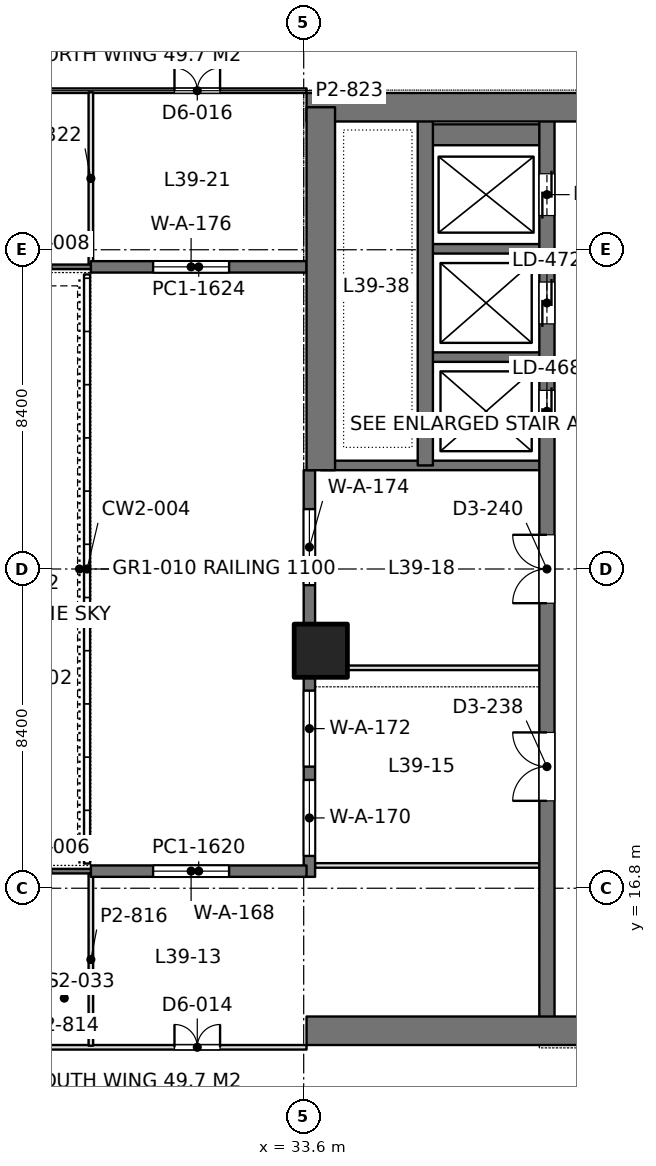
"""IFC4 building model, lengths in metres.
Left out: names, types, materials, properties, quantities, classifications, styles, units other than length and angle.
Written with IfcOpenShell. Run it as: python <this file> out.ifc"""

import sys

from ifc_helpers import new_model, si_unit, direction, frame, frame_2d, origin, origin_2d, place, context, subcontext, project, spatial, rectangle, extrude, element, fill, save


model = new_model("IFC4")
c1 = context("Model", 3, precision=1e-05, world=origin(), true_north=direction((0.0, 1.0)))
c2 = subcontext(c1, "Body", "Model", "MODEL_VIEW")
j1 = project(units=[si_unit("LENGTHUNIT", "METRE"), si_unit("PLANEANGLEUNIT", "RADIAN")], contexts=[c1])
p1 = place(None, origin())
s1 = spatial("IfcSite", under=j1, at=p1, CompositionType="ELEMENT")
p2 = place(p1, origin())
s2 = spatial("IfcBuilding", under=s1, at=p2, CompositionType="ELEMENT")
p3 = place(p2, frame((0.0, 0.0, 173.4)))
s3 = spatial("IfcBuildingStorey", under=s2, at=p3, CompositionType="ELEMENT", Elevation=173.4)
p4 = place(p3, frame((34.05, 23.05, 0.0), z_axis=(0.0, 0.0, 1.0), x_axis=(1.0, 0.0, 0.0)))
e1 = element("IfcColumn", 1, at=p4, inside=s3, PredefinedType="COLUMN", context=c2, shape_type="SweptSolid", body=[
    extrude(rectangle(XDim=1.4, YDim=1.4, at=origin_2d()), origin(), (0.0, 0.0, 1.0), 4.2),
])
p5 = place(p3, frame((33.675, 13.05, 0.0), z_axis=(0.0, 0.0, 1.0), x_axis=(1.0, 0.0, 0.0)))
e2 = element("IfcWall", 2, at=p5, inside=s3, PredefinedType="SHEAR", context=c2, shape_type="SweptSolid", body=[
    extrude(rectangle(XDim=17.85, YDim=0.75, at=frame_2d((8.925, 0.0))), origin(), (0.0, 0.0, 1.0), 4.2),
])
p6 = place(p5, frame((7.175, 0.0, 0.0)))
e3 = element("IfcOpeningElement", 3, at=p6, cuts=e2, PredefinedType="OPENING", context=c2, shape_type="SweptSolid", body=[
    extrude(rectangle(XDim=1.8, YDim=2.4, at=frame_2d((0.9, 1.2))), frame((0.0, 0.385, 0.0), z_axis=(0.0, -1.0, 0.0), x_axis=(1.0, 0.0, 0.0)), (0.0, 0.0, 1.0), 0.77),
])
p7 = place(p3, frame((33.675, 37.35, 0.0), z_axis=(0.0, 0.0, 1.0), x_axis=(1.0, 0.0, 0.0)))
e4 = element("IfcWall", 4, at=p7, inside=s3, PredefinedType="SHEAR", context=c2, shape_type="SweptSolid", body=[
    extrude(rectangle(XDim=17.85, YDim=0.75, at=frame_2d((8.925, 0.0))), origin(), (0.0, 0.0, 1.0), 4.2),
])
p8 = place(p7, frame((7.175, 0.0, 0.0)))
e5 = element("IfcOpeningElement", 5, at=p8, cuts=e4, PredefinedType="OPENING", context=c2, shape_type="SweptSolid", body=[
    extrude(rectangle(XDim=1.8, YDim=2.4, at=frame_2d((0.9, 1.2))), frame((0.0, 0.385, 0.0), z_axis=(0.0, -1.0, 0.0), x_axis=(1.0, 0.0, 0.0)), (0.0, 0.0, 1.0), 0.77),
])
p9 = place(p3, frame((34.05, 27.8, 0.0), z_axis=(0.0, 0.0, 1.0), x_axis=(0.0, 1.0, 0.0)))
e6 = element("IfcWall", 6, at=p9, inside=s3, PredefinedType="SHEAR", context=c2, shape_type="SweptSolid", body=[
    extrude(rectangle(XDim=9.55, YDim=0.75, at=frame_2d((4.775, 0.0))), origin(), (0.0, 0.0, 1.0), 4.2),
])
p10 = place(p3, frame((40.0, 13.05, 0.0), z_axis=(0.0, 0.0, 1.0), x_axis=(0.0, 1.0, 0.0)))
e7 = element("IfcWall", 7, at=p10, inside=s3, PredefinedType="SHEAR", context=c2, shape_type="SweptSolid", body=[
    extrude(rectangle(XDim=24.3, YDim=0.4, at=frame_2d((12.15, 0.0))), origin(), (0.0, 0.0, 1.0), 4.2),
])
p11 = place(p10, frame((15.75, 0.0, 0.0)))
e8 = element("IfcOpeningElement", 8, at=p11, cuts=e7, PredefinedType="OPENING", context=c2, shape_type="SweptSolid", body=[
    extrude(rectangle(XDim=1.1, YDim=2.2, at=frame_2d((0.55, 1.1))), frame((0.0, 0.21, 0.0), z_axis=(0.0, -1.0, 0.0), x_axis=(1.0, 0.0, 0.0)), (0.0, 0.0, 1.0), 0.42),
])
p12 = place(p10, frame((18.6, 0.0, 0.0)))
e9 = element("IfcOpeningElement", 9, at=p12, cuts=e7, PredefinedType="OPENING", context=c2, shape_type="SweptSolid", body=[
    extrude(rectangle(XDim=1.1, YDim=2.2, at=frame_2d((0.55, 1.1))), frame((0.0, 0.21, 0.0), z_axis=(0.0, -1.0, 0.0), x_axis=(1.0, 0.0, 0.0)), (0.0, 0.0, 1.0), 0.42),
])
p13 = place(p10, frame((21.45, 0.0, 0.0)))
e10 = element("IfcOpeningElement", 10, at=p13, cuts=e7, PredefinedType="OPENING", context=c2, shape_type="SweptSolid", body=[
    extrude(rectangle(XDim=1.1, YDim=2.2, at=frame_2d((0.55, 1.1))), frame((0.0, 0.21, 0.0), z_axis=(0.0, -1.0, 0.0), x_axis=(1.0, 0.0, 0.0)), (0.0, 0.0, 1.0), 0.42),
])
p14 = place(p10, frame((6.05, 0.0, 0.0)))
e11 = element("IfcOpeningElement", 11, at=p14, cuts=e7, PredefinedType="OPENING", context=c2, shape_type="SweptSolid", body=[
    extrude(rectangle(XDim=1.8, YDim=2.4, at=frame_2d((0.9, 1.2))), frame((0.0, 0.21, 0.0), z_axis=(0.0, -1.0, 0.0), x_axis=(1.0, 0.0, 0.0)), (0.0, 0.0, 1.0), 0.42),
])
p15 = place(p10, frame((11.25, 0.0, 0.0)))
e12 = element("IfcOpeningElement", 12, at=p15, cuts=e7, PredefinedType="OPENING", context=c2, shape_type="SweptSolid", body=[
    extrude(rectangle(XDim=1.8, YDim=2.4, at=frame_2d((0.9, 1.2))), frame((0.0, 0.21, 0.0), z_axis=(0.0, -1.0, 0.0), x_axis=(1.0, 0.0, 0.0)), (0.0, 0.0, 1.0), 0.42),
])
p16 = place(p3, frame((36.8, 27.925, 0.0), z_axis=(0.0, 0.0, 1.0), x_axis=(0.0, 1.0, 0.0)))
e13 = element("IfcWall", 13, at=p16, inside=s3, PredefinedType="SHEAR", context=c2, shape_type="SweptSolid", body=[
    extrude(rectangle(XDim=9.425, YDim=0.4, at=frame_2d((4.712, 0.0))), origin(), (0.0, 0.0, 1.0), 4.2),
])
p17 = place(p3, frame((40.0, 27.925, 0.0), z_axis=(0.0, 0.0, 1.0), x_axis=(-1.0, 0.0, 0.0)))
e14 = element("IfcWall", 14, at=p17, inside=s3, PredefinedType="SHEAR", context=c2, shape_type="SweptSolid", body=[
    extrude(rectangle(XDim=5.95, YDim=0.25, at=frame_2d((2.975, 0.0))), origin(), (0.0, 0.0, 1.0), 4.2),
])
for number, where, z_axis, x_axis in (
    (15, (40.0, 30.775, 0.0), (0.0, 0.0, 1.0), (-1.0, 0.0, 0.0)),
    (16, (40.0, 33.625, 0.0), (0.0, 0.0, 1.0), (-1.0, 0.0, 0.0)),
):
    element("IfcWall", number, at=place(p3, frame(where, z_axis=z_axis, x_axis=x_axis)), inside=s3, PredefinedType="SHEAR", context=c2, shape_type="SweptSolid", body=[
        extrude(rectangle(XDim=3.2, YDim=0.25, at=frame_2d((1.6, 0.0))), origin(), (0.0, 0.0, 1.0), 4.2),
    ])
p18 = place(p3, frame((40.0, 36.625, 0.0), z_axis=(0.0, 0.0, 1.0), x_axis=(-1.0, 0.0, 0.0)))
e17 = element("IfcWall", 17, at=p18, inside=s3, PredefinedType="SHEAR", context=c2, shape_type="SweptSolid", body=[
    extrude(rectangle(XDim=3.2, YDim=0.55, at=frame_2d((1.6, 0.0))), origin(), (0.0, 0.0, 1.0), 4.2),
])
p19 = place(p3, frame((33.75, 17.1, 0.0), z_axis=(0.0, 0.0, 1.0), x_axis=(0.0, 1.0, 0.0)))
e18 = element("IfcWall", 18, at=p19, inside=s3, PredefinedType="SOLIDWALL", context=c2, shape_type="SweptSolid", body=[
    extrude(rectangle(XDim=10.7, YDim=0.3, at=frame_2d((5.35, 0.0))), origin(), (0.0, 0.0, 1.0), 4.05),
])
p20 = place(p19, frame((0.55, 0.0, 0.1)))
e19 = element("IfcOpeningElement", 19, at=p20, cuts=e18, PredefinedType="OPENING", context=c2, shape_type="SweptSolid", body=[
    extrude(rectangle(XDim=2.0, YDim=3.0, at=frame_2d((1.0, 1.5))), frame((0.0, 0.16, 0.0), z_axis=(0.0, -1.0, 0.0), x_axis=(1.0, 0.0, 0.0)), (0.0, 0.0, 1.0), 0.32),
])
p21 = place(p19, frame((2.9, 0.0, 0.1)))
e20 = element("IfcOpeningElement", 20, at=p21, cuts=e18, PredefinedType="OPENING", context=c2, shape_type="SweptSolid", body=[
    extrude(rectangle(XDim=2.0, YDim=3.0, at=frame_2d((1.0, 1.5))), frame((0.0, 0.16, 0.0), z_axis=(0.0, -1.0, 0.0), x_axis=(1.0, 0.0, 0.0)), (0.0, 0.0, 1.0), 0.32),
])
p22 = place(p19, frame((7.675, 0.0, 0.1)))
e21 = element("IfcOpeningElement", 21, at=p22, cuts=e18, PredefinedType="OPENING", context=c2, shape_type="SweptSolid", body=[
    extrude(rectangle(XDim=2.0, YDim=3.0, at=frame_2d((1.0, 1.5))), frame((0.0, 0.16, 0.0), z_axis=(0.0, -1.0, 0.0), x_axis=(1.0, 0.0, 0.0)), (0.0, 0.0, 1.0), 0.32),
])
p23 = place(p3, frame((25.75, 17.25, 0.0), z_axis=(0.0, 0.0, 1.0), x_axis=(1.0, 0.0, 0.0)))
e22 = element("IfcWall", 22, at=p23, inside=s3, PredefinedType="SOLIDWALL", context=c2, shape_type="SweptSolid", body=[
    extrude(rectangle(XDim=2.25, YDim=0.12, at=frame_2d((1.125, 0.0))), origin(), (0.0, 0.0, 1.0), 4.05),
])
p24 = place(p3, frame((28.0, 17.25, 0.0), z_axis=(0.0, 0.0, 1.0), x_axis=(1.0, 0.0, 0.0)))
e23 = element("IfcWall", 23, at=p24, inside=s3, PredefinedType="SOLIDWALL", context=c2, shape_type="SweptSolid", body=[
    extrude(rectangle(XDim=5.675, YDim=0.3, at=frame_2d((2.837, 0.0))), origin(), (0.0, 0.0, 1.0), 4.05),
])
p25 = place(p24, frame((1.637, 0.0, 0.1)))
e24 = element("IfcOpeningElement", 24, at=p25, cuts=e23, PredefinedType="OPENING", context=c2, shape_type="SweptSolid", body=[
    extrude(rectangle(XDim=2.0, YDim=3.0, at=frame_2d((1.0, 1.5))), frame((0.0, 0.16, 0.0), z_axis=(0.0, -1.0, 0.0), x_axis=(1.0, 0.0, 0.0)), (0.0, 0.0, 1.0), 0.32),
])
p26 = place(p3, frame((25.75, 33.15, 0.0), z_axis=(0.0, 0.0, 1.0), x_axis=(1.0, 0.0, 0.0)))
e25 = element("IfcWall", 25, at=p26, inside=s3, PredefinedType="SOLIDWALL", context=c2, shape_type="SweptSolid", body=[
    extrude(rectangle(XDim=2.25, YDim=0.12, at=frame_2d((1.125, 0.0))), origin(), (0.0, 0.0, 1.0), 4.05),
])
p27 = place(p3, frame((28.0, 33.15, 0.0), z_axis=(0.0, 0.0, 1.0), x_axis=(1.0, 0.0, 0.0)))
e26 = element("IfcWall", 26, at=p27, inside=s3, PredefinedType="SOLIDWALL", context=c2, shape_type="SweptSolid", body=[
    extrude(rectangle(XDim=5.675, YDim=0.3, at=frame_2d((2.837, 0.0))), origin(), (0.0, 0.0, 1.0), 4.05),
])
p28 = place(p27, frame((1.637, 0.0, 0.1)))
e27 = element("IfcOpeningElement", 27, at=p28, cuts=e26, PredefinedType="OPENING", context=c2, shape_type="SweptSolid", body=[
    extrude(rectangle(XDim=2.0, YDim=3.0, at=frame_2d((1.0, 1.5))), frame((0.0, 0.16, 0.0), z_axis=(0.0, -1.0, 0.0), x_axis=(1.0, 0.0, 0.0)), (0.0, 0.0, 1.0), 0.32),
])
p29 = place(p3, frame((33.898, 17.4, 0.0), z_axis=(0.0, 0.0, 1.0), x_axis=(1.0, 0.0, 0.0)))
e28 = element("IfcWall", 28, at=p29, inside=s3, PredefinedType="PARTITIONING", context=c2, shape_type="SweptSolid", body=[
    extrude(rectangle(XDim=5.904, YDim=0.12, at=frame_2d((2.952, 0.0))), origin(), (0.0, 0.0, 1.0), 3.55),
])
p30 = place(p3, frame((34.749, 22.6, 0.0), z_axis=(0.0, 0.0, 1.0), x_axis=(1.0, 0.0, 0.0)))
e29 = element("IfcWall", 29, at=p30, inside=s3, PredefinedType="PARTITIONING", context=c2, shape_type="SweptSolid", body=[
    extrude(rectangle(XDim=5.053, YDim=0.12, at=frame_2d((2.526, 0.0))), origin(), (0.0, 0.0, 1.0), 4.05),
])
p31 = place(p3, frame((16.725, 12.615, 0.0), z_axis=(0.0, 0.0, 1.0), x_axis=(1.0, 0.0, 0.0)))
e30 = element("IfcWall", 30, at=p31, inside=s3, PredefinedType="PARTITIONING", context=c2, shape_type="SweptSolid", body=[
    extrude(rectangle(XDim=16.95, YDim=0.12, at=frame_2d((8.475, 0.0))), origin(), (0.0, 0.0, 1.0), 3.55),
])
p32 = place(p31, frame((2.275, 0.0, 0.0)))
e31 = element("IfcOpeningElement", 31, at=p32, cuts=e30, PredefinedType="OPENING", context=c2, shape_type="SweptSolid", body=[
    extrude(rectangle(XDim=1.2, YDim=2.2, at=frame_2d((0.6, 1.1))), frame((0.0, 0.07, 0.0), z_axis=(0.0, -1.0, 0.0), x_axis=(1.0, 0.0, 0.0)), (0.0, 0.0, 1.0), 0.14),
])
p33 = place(p31, frame((7.575, 0.0, 0.0)))
e32 = element("IfcOpeningElement", 32, at=p33, cuts=e30, PredefinedType="OPENING", context=c2, shape_type="SweptSolid", body=[
    extrude(rectangle(XDim=1.8, YDim=2.2, at=frame_2d((0.9, 1.1))), frame((0.0, 0.07, 0.0), z_axis=(0.0, -1.0, 0.0), x_axis=(1.0, 0.0, 0.0)), (0.0, 0.0, 1.0), 0.14),
])
p34 = place(p31, frame((13.475, 0.0, 0.0)))
e33 = element("IfcOpeningElement", 33, at=p34, cuts=e30, PredefinedType="OPENING", context=c2, shape_type="SweptSolid", body=[
    extrude(rectangle(XDim=1.2, YDim=2.2, at=frame_2d((0.6, 1.1))), frame((0.0, 0.07, 0.0), z_axis=(0.0, -1.0, 0.0), x_axis=(1.0, 0.0, 0.0)), (0.0, 0.0, 1.0), 0.14),
])
p35 = place(p3, frame((28.0, 12.658, 0.0), z_axis=(0.0, 0.0, 1.0), x_axis=(0.0, 1.0, 0.0)))
e34 = element("IfcWall", 34, at=p35, inside=s3, PredefinedType="PARTITIONING", context=c2, shape_type="SweptSolid", body=[
    extrude(rectangle(XDim=4.534, YDim=0.12, at=frame_2d((2.267, 0.0))), origin(), (0.0, 0.0, 1.0), 3.2),
])
p36 = place(p3, frame((16.725, 37.785, 0.0), z_axis=(0.0, 0.0, 1.0), x_axis=(1.0, 0.0, 0.0)))
e35 = element("IfcWall", 35, at=p36, inside=s3, PredefinedType="PARTITIONING", context=c2, shape_type="SweptSolid", body=[
    extrude(rectangle(XDim=16.95, YDim=0.12, at=frame_2d((8.475, 0.0))), origin(), (0.0, 0.0, 1.0), 3.55),
])
p37 = place(p36, frame((2.275, 0.0, 0.0)))
e36 = element("IfcOpeningElement", 36, at=p37, cuts=e35, PredefinedType="OPENING", context=c2, shape_type="SweptSolid", body=[
    extrude(rectangle(XDim=1.2, YDim=2.2, at=frame_2d((0.6, 1.1))), frame((0.0, 0.07, 0.0), z_axis=(0.0, -1.0, 0.0), x_axis=(1.0, 0.0, 0.0)), (0.0, 0.0, 1.0), 0.14),
])
p38 = place(p36, frame((7.575, 0.0, 0.0)))
e37 = element("IfcOpeningElement", 37, at=p38, cuts=e35, PredefinedType="OPENING", context=c2, shape_type="SweptSolid", body=[
    extrude(rectangle(XDim=1.8, YDim=2.2, at=frame_2d((0.9, 1.1))), frame((0.0, 0.07, 0.0), z_axis=(0.0, -1.0, 0.0), x_axis=(1.0, 0.0, 0.0)), (0.0, 0.0, 1.0), 0.14),
])
p39 = place(p36, frame((13.475, 0.0, 0.0)))
e38 = element("IfcOpeningElement", 38, at=p39, cuts=e35, PredefinedType="OPENING", context=c2, shape_type="SweptSolid", body=[
    extrude(rectangle(XDim=1.2, YDim=2.2, at=frame_2d((0.6, 1.1))), frame((0.0, 0.07, 0.0), z_axis=(0.0, -1.0, 0.0), x_axis=(1.0, 0.0, 0.0)), (0.0, 0.0, 1.0), 0.14),
])
p40 = place(p3, frame((28.0, 33.208, 0.0), z_axis=(0.0, 0.0, 1.0), x_axis=(0.0, 1.0, 0.0)))
e39 = element("IfcWall", 39, at=p40, inside=s3, PredefinedType="PARTITIONING", context=c2, shape_type="SweptSolid", body=[
    extrude(rectangle(XDim=4.534, YDim=0.12, at=frame_2d((2.267, 0.0))), origin(), (0.0, 0.0, 1.0), 3.2),
])
p41 = place(p20, origin())
e40 = element("IfcWindow", 40, at=p41, inside=s3, PartitioningType="SINGLE_PANEL", PredefinedType="WINDOW", context=c2, shape_type="SweptSolid", body=[
    extrude(rectangle(XDim=2.0, YDim=3.0, at=frame_2d((1.0, 1.5))), frame((0.0, 0.03, 0.0), z_axis=(0.0, -1.0, 0.0), x_axis=(1.0, 0.0, 0.0)), (0.0, 0.0, 1.0), 0.06),
])
fill(e19, e40)
p42 = place(p21, origin())
e41 = element("IfcWindow", 41, at=p42, inside=s3, PartitioningType="SINGLE_PANEL", PredefinedType="WINDOW", context=c2, shape_type="SweptSolid", body=[
    extrude(rectangle(XDim=2.0, YDim=3.0, at=frame_2d((1.0, 1.5))), frame((0.0, 0.03, 0.0), z_axis=(0.0, -1.0, 0.0), x_axis=(1.0, 0.0, 0.0)), (0.0, 0.0, 1.0), 0.06),
])
fill(e20, e41)
p43 = place(p22, origin())
e42 = element("IfcWindow", 42, at=p43, inside=s3, PartitioningType="SINGLE_PANEL", PredefinedType="WINDOW", context=c2, shape_type="SweptSolid", body=[
    extrude(rectangle(XDim=2.0, YDim=3.0, at=frame_2d((1.0, 1.5))), frame((0.0, 0.03, 0.0), z_axis=(0.0, -1.0, 0.0), x_axis=(1.0, 0.0, 0.0)), (0.0, 0.0, 1.0), 0.06),
])
fill(e21, e42)
p44 = place(p25, origin())
e43 = element("IfcWindow", 43, at=p44, inside=s3, PartitioningType="SINGLE_PANEL", PredefinedType="WINDOW", context=c2, shape_type="SweptSolid", body=[
    extrude(rectangle(XDim=2.0, YDim=3.0, at=frame_2d((1.0, 1.5))), frame((0.0, 0.03, 0.0), z_axis=(0.0, -1.0, 0.0), x_axis=(1.0, 0.0, 0.0)), (0.0, 0.0, 1.0), 0.06),
])
fill(e24, e43)
p45 = place(p28, origin())
e44 = element("IfcWindow", 44, at=p45, inside=s3, PartitioningType="SINGLE_PANEL", PredefinedType="WINDOW", context=c2, shape_type="SweptSolid", body=[
    extrude(rectangle(XDim=2.0, YDim=3.0, at=frame_2d((1.0, 1.5))), frame((0.0, 0.03, 0.0), z_axis=(0.0, -1.0, 0.0), x_axis=(1.0, 0.0, 0.0)), (0.0, 0.0, 1.0), 0.06),
])
fill(e27, e44)
p46 = place(p11, origin())
e45 = element("IfcDoor", 45, at=p46, inside=s3, OperationType="DOUBLE_DOOR_SLIDING", PredefinedType="DOOR", context=c2, shape_type="SweptSolid", body=[
    extrude(rectangle(XDim=1.1, YDim=2.2, at=frame_2d((0.55, 1.1))), frame((0.0, 0.025, 0.0), z_axis=(0.0, -1.0, 0.0), x_axis=(1.0, 0.0, 0.0)), (0.0, 0.0, 1.0), 0.05),
])
fill(e8, e45)
p47 = place(p12, origin())
e46 = element("IfcDoor", 46, at=p47, inside=s3, OperationType="DOUBLE_DOOR_SLIDING", PredefinedType="DOOR", context=c2, shape_type="SweptSolid", body=[
    extrude(rectangle(XDim=1.1, YDim=2.2, at=frame_2d((0.55, 1.1))), frame((0.0, 0.025, 0.0), z_axis=(0.0, -1.0, 0.0), x_axis=(1.0, 0.0, 0.0)), (0.0, 0.0, 1.0), 0.05),
])
fill(e9, e46)
p48 = place(p13, origin())
e47 = element("IfcDoor", 47, at=p48, inside=s3, OperationType="DOUBLE_DOOR_SLIDING", PredefinedType="DOOR", context=c2, shape_type="SweptSolid", body=[
    extrude(rectangle(XDim=1.1, YDim=2.2, at=frame_2d((0.55, 1.1))), frame((0.0, 0.025, 0.0), z_axis=(0.0, -1.0, 0.0), x_axis=(1.0, 0.0, 0.0)), (0.0, 0.0, 1.0), 0.05),
])
fill(e10, e47)
p49 = place(p14, origin())
e48 = element("IfcDoor", 48, at=p49, inside=s3, OperationType="DOUBLE_DOOR_SINGLE_SWING", PredefinedType="DOOR", context=c2, shape_type="SweptSolid", body=[
    extrude(rectangle(XDim=1.8, YDim=2.4, at=frame_2d((0.9, 1.2))), frame((0.0, 0.025, 0.0), z_axis=(0.0, -1.0, 0.0), x_axis=(1.0, 0.0, 0.0)), (0.0, 0.0, 1.0), 0.05),
])
fill(e11, e48)
p50 = place(p15, origin())
e49 = element("IfcDoor", 49, at=p50, inside=s3, OperationType="DOUBLE_DOOR_SINGLE_SWING", PredefinedType="DOOR", context=c2, shape_type="SweptSolid", body=[
    extrude(rectangle(XDim=1.8, YDim=2.4, at=frame_2d((0.9, 1.2))), frame((0.0, 0.025, 0.0), z_axis=(0.0, -1.0, 0.0), x_axis=(1.0, 0.0, 0.0)), (0.0, 0.0, 1.0), 0.05),
])
fill(e12, e49)
p51 = place(p34, origin())
e50 = element("IfcDoor", 50, at=p51, inside=s3, OperationType="DOUBLE_DOOR_SINGLE_SWING_OPPOSITE_LEFT", PredefinedType="DOOR", context=c2, shape_type="SweptSolid", body=[
    extrude(rectangle(XDim=1.2, YDim=2.2, at=frame_2d((0.6, 1.1))), frame((0.0, 0.025, 0.0), z_axis=(0.0, -1.0, 0.0), x_axis=(1.0, 0.0, 0.0)), (0.0, 0.0, 1.0), 0.05),
])
fill(e33, e50)
p52 = place(p39, origin())
e51 = element("IfcDoor", 51, at=p52, inside=s3, OperationType="DOUBLE_DOOR_SINGLE_SWING_OPPOSITE_LEFT", PredefinedType="DOOR", context=c2, shape_type="SweptSolid", body=[
    extrude(rectangle(XDim=1.2, YDim=2.2, at=frame_2d((0.6, 1.1))), frame((0.0, 0.025, 0.0), z_axis=(0.0, -1.0, 0.0), x_axis=(1.0, 0.0, 0.0)), (0.0, 0.0, 1.0), 0.05),
])
fill(e38, e51)
save(model, sys.argv[1])
